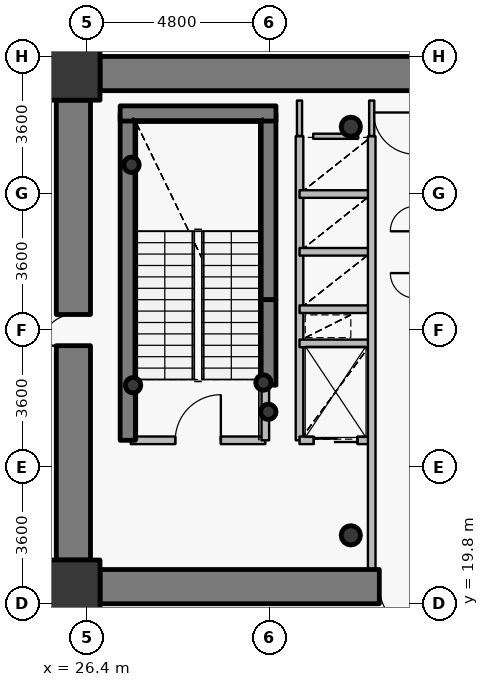
"""IFC4 building model, lengths in metres.
Left out: names, types, materials, properties, quantities, classifications, styles, units other than length and angle.
Written with IfcOpenShell. Run it as: python <this file> out.ifc"""

import sys

from ifc_helpers import new_model, si_unit, direction, frame, frame_2d, origin, origin_2d, place, context, subcontext, project, spatial, rectangle, hollow_circle, extrude, source, transform, mapped, element, fill, save


model = new_model("IFC4")
c1 = context("Model", 3, precision=1e-05, world=origin(), true_north=direction((0.0, 1.0)))
c2 = subcontext(c1, "Body", "Model", "MODEL_VIEW")
j1 = project(units=[si_unit("LENGTHUNIT", "METRE"), si_unit("PLANEANGLEUNIT", "RADIAN")], contexts=[c1])
p1 = place(None, origin())
s1 = spatial("IfcSite", under=j1, at=p1, CompositionType="ELEMENT")
p2 = place(p1, origin())
s2 = spatial("IfcBuilding", under=s1, at=p2, CompositionType="ELEMENT")
p3 = place(p2, frame((0.0, 0.0, 14.4)))
s3 = spatial("IfcBuildingStorey", under=s2, at=p3, CompositionType="ELEMENT", Elevation=14.4)
for number, where, z_axis, x_axis in (
    (1, (26.05, 20.25, 0.0), (0.0, 0.0, 1.0), (1.0, 0.0, 0.0)),
    (2, (26.05, 33.75, 0.0), (0.0, 0.0, 1.0), (1.0, 0.0, 0.0)),
):
    element("IfcColumn", number, at=place(p3, frame(where, z_axis=z_axis, x_axis=x_axis)), inside=s3, PredefinedType="COLUMN", context=c2, shape_type="SweptSolid", body=[
        extrude(rectangle(XDim=1.4, YDim=1.4, at=origin_2d()), origin(), (0.0, 0.0, 1.0), 4.2),
    ])
for number, where, z_axis, x_axis in (
    (3, (33.35, 21.6, 0.0), (0.0, 0.0, 1.0), (1.0, 0.0, 0.0)),
    (4, (33.35, 32.35, 0.0), (0.0, 0.0, 1.0), (1.0, 0.0, 0.0)),
):
    element("IfcColumn", number, at=place(p3, frame(where, z_axis=z_axis, x_axis=x_axis)), inside=s3, PredefinedType="COLUMN", context=c2, shape_type="SweptSolid", body=[
        extrude(hollow_circle(Radius=0.254, WallThickness=0.02, at=origin_2d()), origin(), (0.0, 0.0, 1.0), 4.2),
    ])
p4 = place(p3, frame((27.48, 24.1, 0.0), z_axis=(0.0, 0.0, 1.0), x_axis=(0.0, 1.0, 0.0)))
e5 = element("IfcWall", 5, at=p4, inside=s3, PredefinedType="SHEAR", context=c2, shape_type="SweptSolid", body=[
    extrude(rectangle(XDim=8.6, YDim=0.4, at=frame_2d((4.3, 0.0))), origin(), (0.0, 0.0, 1.0), 4.2),
])
p5 = place(p3, frame((31.18, 27.8, 0.0), z_axis=(0.0, 0.0, 1.0), x_axis=(0.0, 1.0, 0.0)))
e6 = element("IfcWall", 6, at=p5, inside=s3, PredefinedType="SHEAR", context=c2, shape_type="SweptSolid", body=[
    extrude(rectangle(XDim=4.9, YDim=0.4, at=frame_2d((2.45, 0.0))), origin(), (0.0, 0.0, 1.0), 4.2),
])
p6 = place(p3, frame((27.28, 32.7, 0.0), z_axis=(0.0, 0.0, 1.0), x_axis=(1.0, 0.0, 0.0)))
e7 = element("IfcWall", 7, at=p6, inside=s3, PredefinedType="SHEAR", context=c2, shape_type="SweptSolid", body=[
    extrude(rectangle(XDim=4.1, YDim=0.4, at=frame_2d((2.05, 0.0))), origin(), (0.0, 0.0, 1.0), 4.2),
])
for number, where, z_axis, x_axis in (
    (8, (27.58, 31.35, 0.0), (0.0, 0.0, 1.0), (1.0, 0.0, 0.0)),
    (9, (31.05, 25.62, 0.0), (0.0, 0.0, 1.0), (1.0, 0.0, 0.0)),
    (10, (31.18, 24.85, 0.0), (0.0, 0.0, 1.0), (1.0, 0.0, 0.0)),
    (11, (27.62, 25.55, 0.0), (0.0, 0.0, 1.0), (1.0, 0.0, 0.0)),
):
    element("IfcColumn", number, at=place(p3, frame(where, z_axis=z_axis, x_axis=x_axis)), inside=s3, PredefinedType="COLUMN", context=c2, shape_type="SweptSolid", body=[
        extrude(hollow_circle(Radius=0.203, WallThickness=0.016, at=origin_2d()), origin(), (0.0, 0.0, 1.0), 4.2),
    ])
p7 = place(p3, frame((26.75, 33.75, 0.0), z_axis=(0.0, 0.0, 1.0), x_axis=(1.0, 0.0, 0.0)))
e12 = element("IfcWall", 12, at=p7, inside=s3, PredefinedType="SHEAR", context=c2, shape_type="SweptSolid", body=[
    extrude(rectangle(XDim=18.5, YDim=0.9, at=frame_2d((9.25, 0.0))), origin(), (0.0, 0.0, 1.0), 3.35),
])
p8 = place(p3, frame((45.25, 20.25, 0.0), z_axis=(0.0, 0.0, 1.0), x_axis=(-1.0, 0.0, 0.0)))
e13 = element("IfcWall", 13, at=p8, inside=s3, PredefinedType="SHEAR", context=c2, shape_type="SweptSolid", body=[
    extrude(rectangle(XDim=18.5, YDim=0.9, at=frame_2d((9.25, 0.0))), origin(), (0.0, 0.0, 1.0), 3.35),
])
p9 = place(p8, frame((10.0, 0.0, 0.0)))
e14 = element("IfcOpeningElement", 14, at=p9, cuts=e13, PredefinedType="OPENING", context=c2, shape_type="SweptSolid", body=[
    extrude(rectangle(XDim=1.15, YDim=2.15, at=origin_2d()), frame((0.575, 0.46, 1.075), z_axis=(0.0, -1.0, 0.0), x_axis=(1.0, 0.0, 0.0)), (0.0, 0.0, 1.0), 0.92),
])
p10 = place(p3, frame((26.05, 20.95, 0.0), z_axis=(0.0, 0.0, 1.0), x_axis=(0.0, 1.0, 0.0)))
e15 = element("IfcWall", 15, at=p10, inside=s3, PredefinedType="SHEAR", context=c2, shape_type="SweptSolid", body=[
    extrude(rectangle(XDim=12.1, YDim=0.9, at=frame_2d((6.05, 0.0))), origin(), (0.0, 0.0, 1.0), 3.35),
])
p11 = place(p10, frame((5.64, 0.0, 0.0)))
e16 = element("IfcOpeningElement", 16, at=p11, cuts=e15, PredefinedType="OPENING", context=c2, shape_type="SweptSolid", body=[
    extrude(rectangle(XDim=0.82, YDim=2.1, at=origin_2d()), frame((0.41, 0.46, 1.05), z_axis=(0.0, -1.0, 0.0), x_axis=(1.0, 0.0, 0.0)), (0.0, 0.0, 1.0), 0.92),
])
p12 = place(p3, frame((31.18, 25.55, 0.0), z_axis=(0.0, 0.0, 1.0), x_axis=(0.0, 1.0, 0.0)))
e17 = element("IfcWall", 17, at=p12, inside=s3, PredefinedType="SHEAR", context=c2, shape_type="SweptSolid", body=[
    extrude(rectangle(XDim=2.25, YDim=0.4, at=frame_2d((1.125, 0.0))), origin(), (0.0, 0.0, 1.0), 3.5),
])
p13 = place(p3, frame((27.56, 24.1, 0.0), z_axis=(0.0, 0.0, 1.0), x_axis=(1.0, 0.0, 0.0)))
e18 = element("IfcWall", 18, at=p13, inside=s3, PredefinedType="PARTITIONING", context=c2, shape_type="SweptSolid", body=[
    extrude(rectangle(XDim=3.54, YDim=0.2, at=frame_2d((1.77, 0.0))), origin(), (0.0, 0.0, 1.0), 3.9),
])
p14 = place(p13, frame((1.17, 0.0, 0.0)))
e19 = element("IfcOpeningElement", 19, at=p14, cuts=e18, PredefinedType="OPENING", context=c2, shape_type="SweptSolid", body=[
    extrude(rectangle(XDim=1.2, YDim=2.15, at=origin_2d()), frame((0.6, 0.11, 1.075), z_axis=(0.0, -1.0, 0.0), x_axis=(1.0, 0.0, 0.0)), (0.0, 0.0, 1.0), 0.22),
])
p15 = place(p3, frame((31.1, 24.1, 0.0), z_axis=(0.0, 0.0, 1.0), x_axis=(0.0, 1.0, 0.0)))
e20 = element("IfcWall", 20, at=p15, inside=s3, PredefinedType="PARTITIONING", context=c2, shape_type="SweptSolid", body=[
    extrude(rectangle(XDim=1.44, YDim=0.2, at=frame_2d((0.72, 0.0))), origin(), (0.0, 0.0, 1.0), 3.9),
])
p16 = place(p3, frame((32.0, 24.1, 0.0), z_axis=(0.0, 0.0, 1.0), x_axis=(0.0, 1.0, 0.0)))
e21 = element("IfcWall", 21, at=p16, inside=s3, PredefinedType="PARTITIONING", context=c2, shape_type="SweptSolid", body=[
    extrude(rectangle(XDim=8.0, YDim=0.2, at=frame_2d((4.0, 0.0))), origin(), (0.0, 0.0, 1.0), 3.9),
])
p17 = place(p3, frame((32.0, 24.1, 0.0), z_axis=(0.0, 0.0, 1.0), x_axis=(1.0, 0.0, 0.0)))
e22 = element("IfcWall", 22, at=p17, inside=s3, PredefinedType="PARTITIONING", context=c2, shape_type="SweptSolid", body=[
    extrude(rectangle(XDim=1.9, YDim=0.2, at=frame_2d((0.95, 0.0))), origin(), (0.0, 0.0, 1.0), 3.485),
])
p18 = place(p17, frame((0.375, 0.0, 0.0)))
e23 = element("IfcOpeningElement", 23, at=p18, cuts=e22, PredefinedType="OPENING", context=c2, shape_type="SweptSolid", body=[
    extrude(rectangle(XDim=1.15, YDim=2.15, at=origin_2d()), frame((0.575, 0.11, 1.075), z_axis=(0.0, -1.0, 0.0), x_axis=(1.0, 0.0, 0.0)), (0.0, 0.0, 1.0), 0.22),
])
for number, where, z_axis, x_axis in (
    (24, (32.0, 26.65, 0.0), (0.0, 0.0, 1.0), (1.0, 0.0, 0.0)),
    (25, (32.0, 27.55, 0.0), (0.0, 0.0, 1.0), (1.0, 0.0, 0.0)),
    (26, (32.0, 29.06, 0.0), (0.0, 0.0, 1.0), (1.0, 0.0, 0.0)),
    (27, (32.0, 30.58, 0.0), (0.0, 0.0, 1.0), (1.0, 0.0, 0.0)),
):
    element("IfcWall", number, at=place(p3, frame(where, z_axis=z_axis, x_axis=x_axis)), inside=s3, PredefinedType="PARTITIONING", context=c2, shape_type="SweptSolid", body=[
        extrude(rectangle(XDim=1.9, YDim=0.2, at=frame_2d((0.95, 0.0))), origin(), (0.0, 0.0, 1.0), 3.485),
    ])
p19 = place(p3, frame((33.9, 20.7, 0.0), z_axis=(0.0, 0.0, 1.0), x_axis=(0.0, 1.0, 0.0)))
e28 = element("IfcWall", 28, at=p19, inside=s3, PredefinedType="PARTITIONING", context=c2, shape_type="SweptSolid", body=[
    extrude(rectangle(XDim=11.4, YDim=0.2, at=frame_2d((5.7, 0.0))), origin(), (0.0, 0.0, 1.0), 3.485),
])
p20 = place(p3, frame((32.36, 32.1, 0.0), z_axis=(0.0, 0.0, 1.0), x_axis=(1.0, 0.0, 0.0)))
e29 = element("IfcWall", 29, at=p20, inside=s3, PredefinedType="PARTITIONING", context=c2, shape_type="SweptSolid", body=[
    extrude(rectangle(XDim=1.18, YDim=0.135, at=frame_2d((0.59, 0.0))), origin(), (0.0, 0.0, 1.0), 3.485),
])
p21 = place(p3, frame((32.0, 33.04, 0.0), z_axis=(0.0, 0.0, 1.0), x_axis=(0.0, -1.0, 0.0)))
e30 = element("IfcWall", 30, at=p21, inside=s3, PredefinedType="PARTITIONING", context=c2, shape_type="SweptSolid", body=[
    extrude(rectangle(XDim=0.93, YDim=0.135, at=frame_2d((0.465, 0.0))), origin(), (0.0, 0.0, 1.0), 3.435),
])
p22 = place(p3, frame((33.9, 32.11, 0.0), z_axis=(0.0, 0.0, 1.0), x_axis=(0.0, 1.0, 0.0)))
e31 = element("IfcWall", 31, at=p22, inside=s3, PredefinedType="PARTITIONING", context=c2, shape_type="SweptSolid", body=[
    extrude(rectangle(XDim=0.93, YDim=0.135, at=frame_2d((0.465, 0.0))), origin(), (0.0, 0.0, 1.0), 3.485),
])
p23 = place(p3, frame((25.95, 38.893, 0.0), z_axis=(0.0, 0.0, 1.0), x_axis=(0.0, -1.0, 0.0)))
e32 = element("IfcWall", 32, at=p23, inside=s3, PredefinedType="PARTITIONING", context=c2, shape_type="SweptSolid", body=[
    extrude(rectangle(XDim=4.693, YDim=0.135, at=frame_2d((2.346, 0.0))), origin(), (0.0, 0.0, 1.0), 3.085),
])
for number, where, z_axis, x_axis in (
    (33, (25.6, 34.2, 0.0), (0.0, 0.0, 1.0), (0.0, -1.0, 0.0)),
    (34, (25.6, 20.94, 0.0), (0.0, 0.0, 1.0), (0.0, -1.0, 0.0)),
):
    element("IfcWall", number, at=place(p3, frame(where, z_axis=z_axis, x_axis=x_axis)), inside=s3, PredefinedType="PARTITIONING", context=c2, shape_type="SweptSolid", body=[
        extrude(rectangle(XDim=1.14, YDim=0.135, at=frame_2d((0.57, 0.0))), origin(), (0.0, 0.0, 1.0), 3.9),
    ])
p24 = place(p3, frame((25.907, 19.8, 0.0), z_axis=(0.0, 0.0, 1.0), x_axis=(1.0, 0.0, 0.0)))
e35 = element("IfcWall", 35, at=p24, inside=s3, PredefinedType="PARTITIONING", context=c2, shape_type="SweptSolid", body=[
    extrude(rectangle(XDim=0.833, YDim=0.135, at=frame_2d((0.416, 0.0))), origin(), (0.0, 0.0, 1.0), 3.085),
])
m1 = source(origin(), c2, "Body", "SweptSolid", [
    extrude(rectangle(XDim=0.82, YDim=2.1, at=origin_2d()), frame((0.41, 0.025, 1.05), z_axis=(0.0, -1.0, 0.0), x_axis=(1.0, 0.0, 0.0)), (0.0, 0.0, 1.0), 0.05),
])
p25 = place(p11, origin())
e36 = element("IfcDoor", 36, at=p25, inside=s3, OperationType="SINGLE_SWING_LEFT", PredefinedType="DOOR", context=c2, shape_type="MappedRepresentation", body=[
    mapped(m1, transform((0.0, 0.0, 0.0), x_axis=(1.0, 0.0, 0.0), y_axis=(0.0, 1.0, 0.0), z_axis=(0.0, 0.0, 1.0), scale=1.0)),
])
fill(e16, e36)
m2 = source(origin(), c2, "Body", "SweptSolid", [
    extrude(rectangle(XDim=1.15, YDim=2.15, at=origin_2d()), frame((0.575, 0.025, 1.075), z_axis=(0.0, -1.0, 0.0), x_axis=(1.0, 0.0, 0.0)), (0.0, 0.0, 1.0), 0.05),
])
p26 = place(p9, origin())
e37 = element("IfcDoor", 37, at=p26, inside=s3, OperationType="SINGLE_SWING_LEFT", PredefinedType="DOOR", context=c2, shape_type="MappedRepresentation", body=[
    mapped(m2, transform((0.0, 0.0, 0.0), x_axis=(1.0, 0.0, 0.0), y_axis=(0.0, 1.0, 0.0), z_axis=(0.0, 0.0, 1.0), scale=1.0)),
])
fill(e14, e37)
m3 = source(origin(), c2, "Body", "SweptSolid", [
    extrude(rectangle(XDim=1.2, YDim=2.15, at=origin_2d()), frame((0.6, 0.025, 1.075), z_axis=(0.0, -1.0, 0.0), x_axis=(1.0, 0.0, 0.0)), (0.0, 0.0, 1.0), 0.05),
])
p27 = place(p14, origin())
e38 = element("IfcDoor", 38, at=p27, inside=s3, OperationType="SINGLE_SWING_RIGHT", PredefinedType="DOOR", context=c2, shape_type="MappedRepresentation", body=[
    mapped(m3, transform((0.0, 0.0, 0.0), x_axis=(1.0, 0.0, 0.0), y_axis=(0.0, 1.0, 0.0), z_axis=(0.0, 0.0, 1.0), scale=1.0)),
])
fill(e19, e38)
m4 = source(origin(), c2, "Body", "SweptSolid", [
    extrude(rectangle(XDim=1.15, YDim=2.15, at=origin_2d()), frame((0.575, 0.025, 1.075), z_axis=(0.0, -1.0, 0.0), x_axis=(1.0, 0.0, 0.0)), (0.0, 0.0, 1.0), 0.05),
])
p28 = place(p18, origin())
e39 = element("IfcDoor", 39, at=p28, inside=s3, OperationType="DOUBLE_DOOR_SLIDING", PredefinedType="USERDEFINED", context=c2, shape_type="MappedRepresentation", body=[
    mapped(m4, transform((0.0, 0.0, 0.0), x_axis=(1.0, 0.0, 0.0), y_axis=(0.0, 1.0, 0.0), z_axis=(0.0, 0.0, 1.0), scale=1.0)),
])
fill(e23, e39)
save(model, sys.argv[1])
